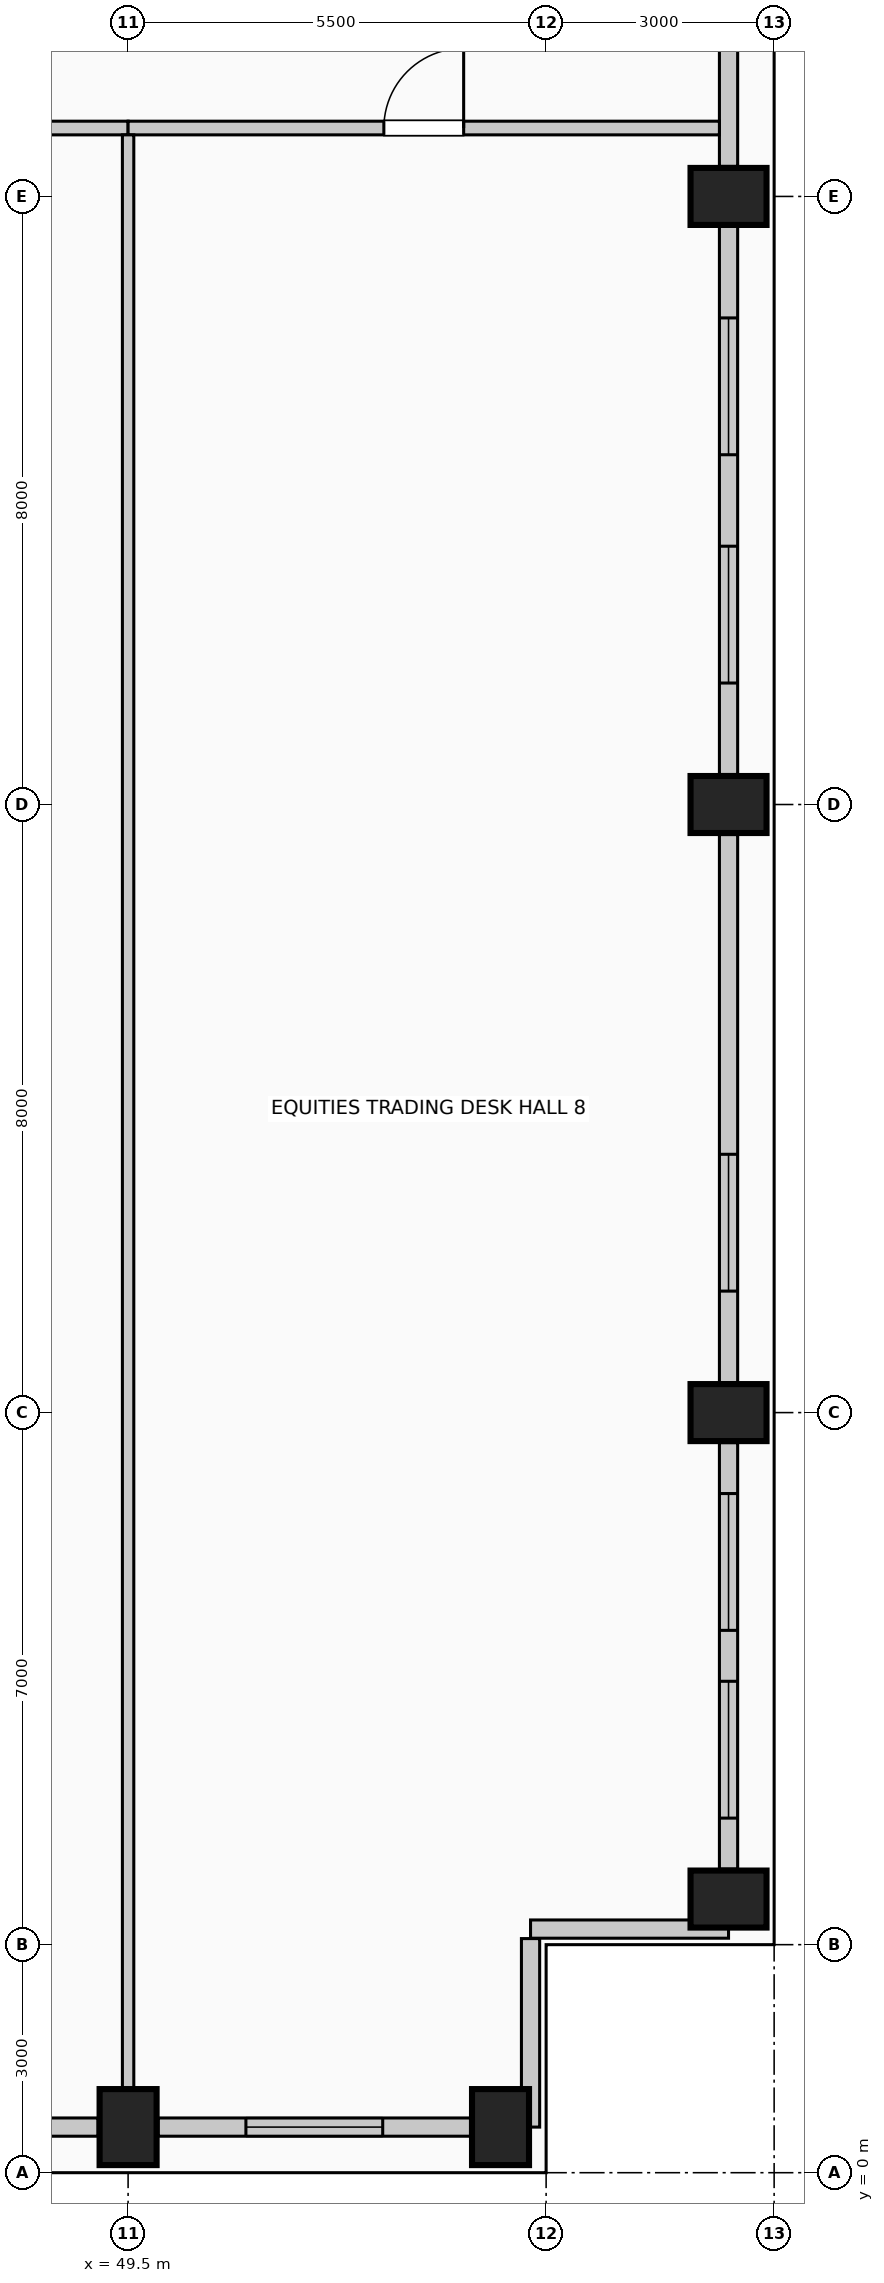
"""IFC4 building model, lengths in metres.
Left out: names, types, materials, properties, quantities, classifications, styles, units other than length and angle.
Written with IfcOpenShell. Run it as: python <this file> out.ifc"""

import sys

from ifc_helpers import new_model, si_unit, direction, frame, frame_2d, origin, origin_2d, place, context, subcontext, project, spatial, rectangle, extrude, element, fill, save


model = new_model("IFC4")
c1 = context("Model", 3, precision=1e-05, world=origin(), true_north=direction((0.0, 1.0)))
c2 = subcontext(c1, "Body", "Model", "MODEL_VIEW")
j1 = project(units=[si_unit("LENGTHUNIT", "METRE"), si_unit("PLANEANGLEUNIT", "RADIAN")], contexts=[c1])
p1 = place(None, origin())
s1 = spatial("IfcSite", under=j1, at=p1, CompositionType="ELEMENT")
p2 = place(p1, origin())
s2 = spatial("IfcBuilding", under=s1, at=p2, CompositionType="ELEMENT")
p3 = place(p2, frame((0.0, 0.0, 256.6)))
s3 = spatial("IfcBuildingStorey", under=s2, at=p3, CompositionType="ELEMENT", Elevation=256.6)
for number, where, z_axis, x_axis in (
    (1, (49.5, 0.6, 0.0), (0.0, 0.0, 1.0), (1.0, 0.0, 0.0)),
    (2, (54.4, 0.6, 0.0), (0.0, 0.0, 1.0), (1.0, 0.0, 0.0)),
    (3, (57.4, 3.6, 0.0), (0.0, 0.0, 1.0), (0.0, 1.0, 0.0)),
    (4, (57.4, 10.0, 0.0), (0.0, 0.0, 1.0), (0.0, 1.0, 0.0)),
    (5, (57.4, 18.0, 0.0), (0.0, 0.0, 1.0), (0.0, 1.0, 0.0)),
    (6, (57.4, 26.0, 0.0), (0.0, 0.0, 1.0), (0.0, 1.0, 0.0)),
):
    element("IfcColumn", number, at=place(p3, frame(where, z_axis=z_axis, x_axis=x_axis)), inside=s3, PredefinedType="COLUMN", context=c2, shape_type="SweptSolid", body=[
        extrude(rectangle(XDim=0.75, YDim=1.0, at=origin_2d()), origin(), (0.0, 0.0, 1.0), 4.0),
    ])
p4 = place(p3, frame((49.105, 0.6, 0.0), z_axis=(0.0, 0.0, 1.0), x_axis=(-1.0, 0.0, 0.0)))
e7 = element("IfcWall", 7, at=p4, inside=s3, PredefinedType="SOLIDWALL", context=c2, shape_type="SweptSolid", body=[
    extrude(rectangle(XDim=4.71, YDim=0.24, at=frame_2d((2.355, 0.0))), origin(), (0.0, 0.0, 1.0), 3.0),
])
p5 = place(p3, frame((54.005, 0.6, 0.0), z_axis=(0.0, 0.0, 1.0), x_axis=(-1.0, 0.0, 0.0)))
e8 = element("IfcWall", 8, at=p5, inside=s3, PredefinedType="SOLIDWALL", context=c2, shape_type="SweptSolid", body=[
    extrude(rectangle(XDim=4.11, YDim=0.24, at=frame_2d((2.055, 0.0))), origin(), (0.0, 0.0, 1.0), 3.0),
])
p6 = place(p5, frame((1.155, 0.0, 0.42)))
e9 = element("IfcOpeningElement", 9, at=p6, cuts=e8, PredefinedType="OPENING", context=c2, shape_type="SweptSolid", body=[
    extrude(rectangle(XDim=1.8, YDim=2.2, at=frame_2d((0.9, 1.1))), frame((0.0, 0.13, 0.0), z_axis=(0.0, -1.0, 0.0), x_axis=(1.0, 0.0, 0.0)), (0.0, 0.0, 1.0), 0.26),
])
p7 = place(p3, frame((57.4, 9.605, 0.0), z_axis=(0.0, 0.0, 1.0), x_axis=(0.0, -1.0, 0.0)))
e10 = element("IfcWall", 10, at=p7, inside=s3, PredefinedType="SOLIDWALL", context=c2, shape_type="SweptSolid", body=[
    extrude(rectangle(XDim=5.61, YDim=0.24, at=frame_2d((2.805, 0.0))), origin(), (0.0, 0.0, 1.0), 3.0),
])
p8 = place(p7, frame((0.67, 0.0, 0.42)))
e11 = element("IfcOpeningElement", 11, at=p8, cuts=e10, PredefinedType="OPENING", context=c2, shape_type="SweptSolid", body=[
    extrude(rectangle(XDim=1.8, YDim=2.2, at=frame_2d((0.9, 1.1))), frame((0.0, 0.13, 0.0), z_axis=(0.0, -1.0, 0.0), x_axis=(1.0, 0.0, 0.0)), (0.0, 0.0, 1.0), 0.26),
])
p9 = place(p7, frame((3.14, 0.0, 0.42)))
e12 = element("IfcOpeningElement", 12, at=p9, cuts=e10, PredefinedType="OPENING", context=c2, shape_type="SweptSolid", body=[
    extrude(rectangle(XDim=1.8, YDim=2.2, at=frame_2d((0.9, 1.1))), frame((0.0, 0.13, 0.0), z_axis=(0.0, -1.0, 0.0), x_axis=(1.0, 0.0, 0.0)), (0.0, 0.0, 1.0), 0.26),
])
p10 = place(p3, frame((57.4, 17.605, 0.0), z_axis=(0.0, 0.0, 1.0), x_axis=(0.0, -1.0, 0.0)))
e13 = element("IfcWall", 13, at=p10, inside=s3, PredefinedType="SOLIDWALL", context=c2, shape_type="SweptSolid", body=[
    extrude(rectangle(XDim=7.21, YDim=0.24, at=frame_2d((3.605, 0.0))), origin(), (0.0, 0.0, 1.0), 3.0),
])
p11 = place(p10, frame((4.207, 0.0, 0.42)))
e14 = element("IfcOpeningElement", 14, at=p11, cuts=e13, PredefinedType="OPENING", context=c2, shape_type="SweptSolid", body=[
    extrude(rectangle(XDim=1.8, YDim=2.2, at=frame_2d((0.9, 1.1))), frame((0.0, 0.13, 0.0), z_axis=(0.0, -1.0, 0.0), x_axis=(1.0, 0.0, 0.0)), (0.0, 0.0, 1.0), 0.26),
])
p12 = place(p3, frame((57.4, 25.605, 0.0), z_axis=(0.0, 0.0, 1.0), x_axis=(0.0, -1.0, 0.0)))
e15 = element("IfcWall", 15, at=p12, inside=s3, PredefinedType="SOLIDWALL", context=c2, shape_type="SweptSolid", body=[
    extrude(rectangle(XDim=7.21, YDim=0.24, at=frame_2d((3.605, 0.0))), origin(), (0.0, 0.0, 1.0), 3.0),
])
p13 = place(p12, frame((1.203, 0.0, 0.42)))
e16 = element("IfcOpeningElement", 16, at=p13, cuts=e15, PredefinedType="OPENING", context=c2, shape_type="SweptSolid", body=[
    extrude(rectangle(XDim=1.8, YDim=2.2, at=frame_2d((0.9, 1.1))), frame((0.0, 0.13, 0.0), z_axis=(0.0, -1.0, 0.0), x_axis=(1.0, 0.0, 0.0)), (0.0, 0.0, 1.0), 0.26),
])
p14 = place(p12, frame((4.207, 0.0, 0.42)))
e17 = element("IfcOpeningElement", 17, at=p14, cuts=e15, PredefinedType="OPENING", context=c2, shape_type="SweptSolid", body=[
    extrude(rectangle(XDim=1.8, YDim=2.2, at=frame_2d((0.9, 1.1))), frame((0.0, 0.13, 0.0), z_axis=(0.0, -1.0, 0.0), x_axis=(1.0, 0.0, 0.0)), (0.0, 0.0, 1.0), 0.26),
])
p15 = place(p3, frame((57.4, 33.605, 0.0), z_axis=(0.0, 0.0, 1.0), x_axis=(0.0, -1.0, 0.0)))
e18 = element("IfcWall", 18, at=p15, inside=s3, PredefinedType="SOLIDWALL", context=c2, shape_type="SweptSolid", body=[
    extrude(rectangle(XDim=7.21, YDim=0.24, at=frame_2d((3.605, 0.0))), origin(), (0.0, 0.0, 1.0), 3.0),
])
p16 = place(p3, frame((57.4, 3.205, 0.0), z_axis=(0.0, 0.0, 1.0), x_axis=(-1.0, 0.0, 0.0)))
e19 = element("IfcWall", 19, at=p16, inside=s3, PredefinedType="SOLIDWALL", context=c2, shape_type="SweptSolid", body=[
    extrude(rectangle(XDim=2.605, YDim=0.24, at=frame_2d((1.302, 0.0))), origin(), (0.0, 0.0, 1.0), 3.75),
])
p17 = place(p3, frame((54.795, 3.08, 0.0), z_axis=(0.0, 0.0, 1.0), x_axis=(0.0, -1.0, 0.0)))
e20 = element("IfcWall", 20, at=p17, inside=s3, PredefinedType="SOLIDWALL", context=c2, shape_type="SweptSolid", body=[
    extrude(rectangle(XDim=2.48, YDim=0.24, at=frame_2d((1.24, 0.0))), origin(), (0.0, 0.0, 1.0), 3.75),
])
p18 = place(p3, frame((41.32, 26.9, 0.0), z_axis=(0.0, 0.0, 1.0), x_axis=(1.0, 0.0, 0.0)))
e21 = element("IfcWall", 21, at=p18, inside=s3, PredefinedType="PARTITIONING", context=c2, shape_type="SweptSolid", body=[
    extrude(rectangle(XDim=8.18, YDim=0.18, at=frame_2d((4.09, 0.0))), origin(), (0.0, 0.0, 1.0), 3.75),
])
p19 = place(p18, frame((3.615, 0.0, 0.0)))
e22 = element("IfcOpeningElement", 22, at=p19, cuts=e21, PredefinedType="OPENING", context=c2, shape_type="SweptSolid", body=[
    extrude(rectangle(XDim=0.95, YDim=2.15, at=frame_2d((0.475, 1.075))), frame((0.0, 0.1, 0.0), z_axis=(0.0, -1.0, 0.0), x_axis=(1.0, 0.0, 0.0)), (0.0, 0.0, 1.0), 0.2),
])
p20 = place(p3, frame((49.5, 26.9, 0.0), z_axis=(0.0, 0.0, 1.0), x_axis=(1.0, 0.0, 0.0)))
e23 = element("IfcWall", 23, at=p20, inside=s3, PredefinedType="PARTITIONING", context=c2, shape_type="SweptSolid", body=[
    extrude(rectangle(XDim=7.78, YDim=0.18, at=frame_2d((3.89, 0.0))), origin(), (0.0, 0.0, 1.0), 3.75),
])
p21 = place(p20, frame((3.365, 0.0, 0.0)))
e24 = element("IfcOpeningElement", 24, at=p21, cuts=e23, PredefinedType="OPENING", context=c2, shape_type="SweptSolid", body=[
    extrude(rectangle(XDim=1.05, YDim=2.15, at=frame_2d((0.525, 1.075))), frame((0.0, 0.1, 0.0), z_axis=(0.0, -1.0, 0.0), x_axis=(1.0, 0.0, 0.0)), (0.0, 0.0, 1.0), 0.2),
])
p22 = place(p3, frame((49.5, 1.1, 0.0), z_axis=(0.0, 0.0, 1.0), x_axis=(0.0, 1.0, 0.0)))
e25 = element("IfcWall", 25, at=p22, inside=s3, PredefinedType="PARTITIONING", context=c2, shape_type="SweptSolid", body=[
    extrude(rectangle(XDim=25.71, YDim=0.15, at=frame_2d((12.855, 0.0))), origin(), (0.0, 0.0, 1.0), 3.75),
])
p23 = place(p6, origin())
e26 = element("IfcWindow", 26, at=p23, inside=s3, PartitioningType="SINGLE_PANEL", PredefinedType="WINDOW", context=c2, shape_type="SweptSolid", body=[
    extrude(rectangle(XDim=1.8, YDim=2.2, at=frame_2d((0.9, 1.1))), frame((0.0, 0.03, 0.0), z_axis=(0.0, -1.0, 0.0), x_axis=(1.0, 0.0, 0.0)), (0.0, 0.0, 1.0), 0.06),
])
fill(e9, e26)
p24 = place(p8, origin())
e27 = element("IfcWindow", 27, at=p24, inside=s3, PartitioningType="SINGLE_PANEL", PredefinedType="WINDOW", context=c2, shape_type="SweptSolid", body=[
    extrude(rectangle(XDim=1.8, YDim=2.2, at=frame_2d((0.9, 1.1))), frame((0.0, 0.03, 0.0), z_axis=(0.0, -1.0, 0.0), x_axis=(1.0, 0.0, 0.0)), (0.0, 0.0, 1.0), 0.06),
])
fill(e11, e27)
p25 = place(p9, origin())
e28 = element("IfcWindow", 28, at=p25, inside=s3, PartitioningType="SINGLE_PANEL", PredefinedType="WINDOW", context=c2, shape_type="SweptSolid", body=[
    extrude(rectangle(XDim=1.8, YDim=2.2, at=frame_2d((0.9, 1.1))), frame((0.0, 0.03, 0.0), z_axis=(0.0, -1.0, 0.0), x_axis=(1.0, 0.0, 0.0)), (0.0, 0.0, 1.0), 0.06),
])
fill(e12, e28)
p26 = place(p11, origin())
e29 = element("IfcWindow", 29, at=p26, inside=s3, PartitioningType="SINGLE_PANEL", PredefinedType="WINDOW", context=c2, shape_type="SweptSolid", body=[
    extrude(rectangle(XDim=1.8, YDim=2.2, at=frame_2d((0.9, 1.1))), frame((0.0, 0.03, 0.0), z_axis=(0.0, -1.0, 0.0), x_axis=(1.0, 0.0, 0.0)), (0.0, 0.0, 1.0), 0.06),
])
fill(e14, e29)
p27 = place(p13, origin())
e30 = element("IfcWindow", 30, at=p27, inside=s3, PartitioningType="SINGLE_PANEL", PredefinedType="WINDOW", context=c2, shape_type="SweptSolid", body=[
    extrude(rectangle(XDim=1.8, YDim=2.2, at=frame_2d((0.9, 1.1))), frame((0.0, 0.03, 0.0), z_axis=(0.0, -1.0, 0.0), x_axis=(1.0, 0.0, 0.0)), (0.0, 0.0, 1.0), 0.06),
])
fill(e16, e30)
p28 = place(p14, origin())
e31 = element("IfcWindow", 31, at=p28, inside=s3, PartitioningType="SINGLE_PANEL", PredefinedType="WINDOW", context=c2, shape_type="SweptSolid", body=[
    extrude(rectangle(XDim=1.8, YDim=2.2, at=frame_2d((0.9, 1.1))), frame((0.0, 0.03, 0.0), z_axis=(0.0, -1.0, 0.0), x_axis=(1.0, 0.0, 0.0)), (0.0, 0.0, 1.0), 0.06),
])
fill(e17, e31)
p29 = place(p21, origin())
e32 = element("IfcDoor", 32, at=p29, inside=s3, OperationType="SINGLE_SWING_RIGHT", PredefinedType="DOOR", context=c2, shape_type="SweptSolid", body=[
    extrude(rectangle(XDim=1.05, YDim=2.15, at=frame_2d((0.525, 1.075))), frame((0.0, 0.025, 0.0), z_axis=(0.0, -1.0, 0.0), x_axis=(1.0, 0.0, 0.0)), (0.0, 0.0, 1.0), 0.05),
])
fill(e24, e32)
save(model, sys.argv[1])
